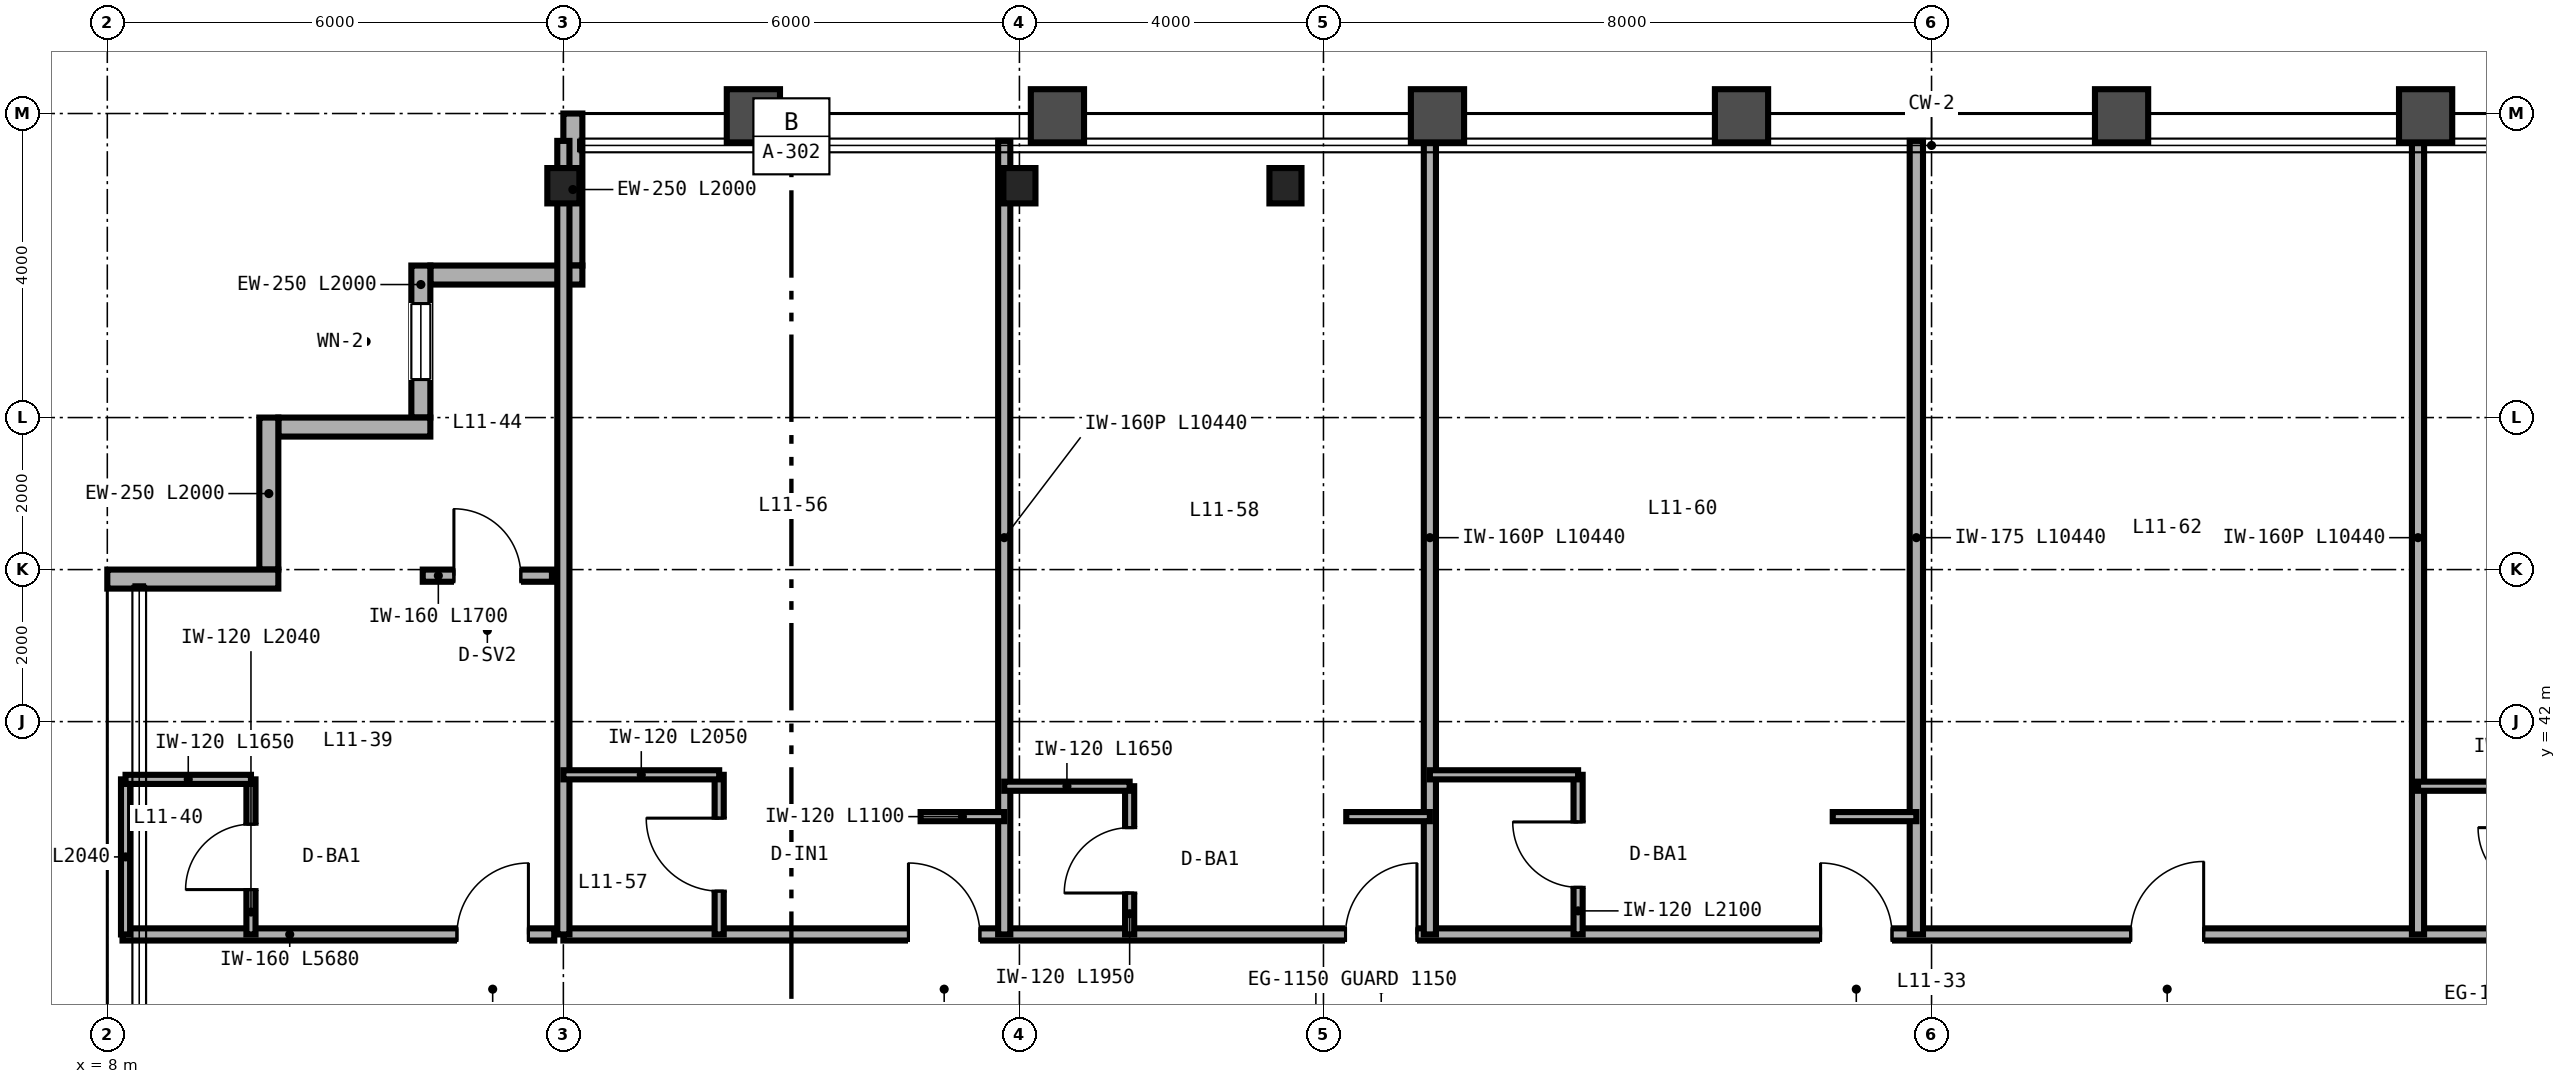
"""IFC4 building model, lengths in metres.
Left out: names, types, materials, properties, quantities, classifications, styles, units other than length and angle.
Written with IfcOpenShell. Run it as: python <this file> out.ifc"""

import sys

from ifc_helpers import new_model, si_unit, direction, frame, frame_2d, origin, origin_2d, place, context, subcontext, project, spatial, rectangle, i_section, extrude, source, transform, mapped, element, fill, save


model = new_model("IFC4")
c1 = context("Model", 3, precision=1e-05, world=origin(), true_north=direction((0.0, 1.0)))
c2 = subcontext(c1, "Body", "Model", "MODEL_VIEW")
j1 = project(units=[si_unit("LENGTHUNIT", "METRE"), si_unit("PLANEANGLEUNIT", "RADIAN")], contexts=[c1])
p1 = place(None, origin())
s1 = spatial("IfcSite", under=j1, at=p1, CompositionType="ELEMENT")
p2 = place(p1, origin())
s2 = spatial("IfcBuilding", under=s1, at=p2, CompositionType="ELEMENT")
p3 = place(p2, frame((0.0, 0.0, 49.2)))
s3 = spatial("IfcBuildingStorey", under=s2, at=p3, CompositionType="ELEMENT", Elevation=49.2)
m1 = source(origin(), c2, "Body", "SweptSolid", [
    extrude(i_section(OverallWidth=0.422, OverallDepth=0.465, WebThickness=0.045, FlangeThickness=0.073, FilletRadius=0.025, at=origin_2d()), origin(), (0.0, 0.0, 1.0), 3.35),
])
for number, where, z_axis, x_axis in (
    (1, (14.0, 49.05, 0.0), (0.0, 0.0, 1.0), (1.0, 0.0, 0.0)),
    (2, (20.0, 49.05, 0.0), (0.0, 0.0, 1.0), (1.0, 0.0, 0.0)),
    (3, (23.5, 49.05, 0.0), (0.0, 0.0, 1.0), (1.0, 0.0, 0.0)),
):
    element("IfcColumn", number, at=place(p3, frame(where, z_axis=z_axis, x_axis=x_axis)), inside=s3, PredefinedType="COLUMN", context=c2, shape_type="MappedRepresentation", body=[
        mapped(m1, transform((0.0, 0.0, 0.0), scale=1.0)),
    ])
p4 = place(p3, frame((14.125, 50.0, 0.0), z_axis=(0.0, 0.0, 1.0), x_axis=(0.0, -1.0, 0.0)))
e4 = element("IfcWall", 4, at=p4, inside=s3, PredefinedType="SOLIDWALL", context=c2, shape_type="SweptSolid", body=[
    extrude(rectangle(XDim=2.0, YDim=0.25, at=frame_2d((1.0, 0.0))), origin(), (0.0, 0.0, 1.0), 2.657),
])
p5 = place(p3, frame((14.25, 47.875, 0.0), z_axis=(0.0, 0.0, 1.0), x_axis=(-1.0, 0.0, 0.0)))
e5 = element("IfcWall", 5, at=p5, inside=s3, PredefinedType="SOLIDWALL", context=c2, shape_type="SweptSolid", body=[
    extrude(rectangle(XDim=2.0, YDim=0.25, at=frame_2d((1.0, 0.0))), origin(), (0.0, 0.0, 1.0), 3.35),
])
p6 = place(p3, frame((12.125, 48.0, 0.0), z_axis=(0.0, 0.0, 1.0), x_axis=(0.0, -1.0, 0.0)))
e6 = element("IfcWall", 6, at=p6, inside=s3, PredefinedType="SOLIDWALL", context=c2, shape_type="SweptSolid", body=[
    extrude(rectangle(XDim=2.0, YDim=0.25, at=frame_2d((1.0, 0.0))), origin(), (0.0, 0.0, 1.0), 3.35),
])
p7 = place(p6, frame((0.5, 0.0, 0.85)))
e7 = element("IfcOpeningElement", 7, at=p7, cuts=e6, PredefinedType="OPENING", context=c2, shape_type="SweptSolid", body=[
    extrude(rectangle(XDim=1.0, YDim=1.9, at=frame_2d((0.5, 0.95))), frame((0.0, 0.135, 0.0), z_axis=(0.0, -1.0, 0.0), x_axis=(1.0, 0.0, 0.0)), (0.0, 0.0, 1.0), 0.27),
])
for number, where, z_axis, x_axis in (
    (8, (12.25, 45.875, 0.0), (0.0, 0.0, 1.0), (-1.0, 0.0, 0.0)),
    (9, (10.125, 46.0, 0.0), (0.0, 0.0, 1.0), (0.0, -1.0, 0.0)),
):
    element("IfcWall", number, at=place(p3, frame(where, z_axis=z_axis, x_axis=x_axis)), inside=s3, PredefinedType="SOLIDWALL", context=c2, shape_type="SweptSolid", body=[
        extrude(rectangle(XDim=2.0, YDim=0.25, at=frame_2d((1.0, 0.0))), origin(), (0.0, 0.0, 1.0), 3.35),
    ])
p8 = place(p3, frame((10.25, 43.875, 0.0), z_axis=(0.0, 0.0, 1.0), x_axis=(-1.0, 0.0, 0.0)))
e10 = element("IfcWall", 10, at=p8, inside=s3, PredefinedType="SOLIDWALL", context=c2, shape_type="SweptSolid", body=[
    extrude(rectangle(XDim=2.25, YDim=0.25, at=frame_2d((1.125, 0.0))), origin(), (0.0, 0.0, 1.0), 3.35),
])
p9 = place(p3, frame((8.2, 39.2, 0.0), z_axis=(0.0, 0.0, 1.0), x_axis=(1.0, 0.0, 0.0)))
e11 = element("IfcWall", 11, at=p9, inside=s3, PredefinedType="PARTITIONING", context=c2, shape_type="SweptSolid", body=[
    extrude(rectangle(XDim=5.68, YDim=0.16, at=frame_2d((2.84, 0.0))), origin(), (0.0, 0.0, 1.0), 3.35),
])
p10 = place(p9, frame((4.4, 0.0, 0.0)))
e12 = element("IfcOpeningElement", 12, at=p10, cuts=e11, PredefinedType="OPENING", context=c2, shape_type="SweptSolid", body=[
    extrude(rectangle(XDim=0.94, YDim=2.15, at=frame_2d((0.47, 1.075))), frame((0.0, 0.09, 0.0), z_axis=(0.0, -1.0, 0.0), x_axis=(1.0, 0.0, 0.0)), (0.0, 0.0, 1.0), 0.18),
])
p11 = place(p3, frame((9.89, 39.2, 0.0), z_axis=(0.0, 0.0, 1.0), x_axis=(0.0, 1.0, 0.0)))
e13 = element("IfcWall", 13, at=p11, inside=s3, PredefinedType="PARTITIONING", context=c2, shape_type="SweptSolid", body=[
    extrude(rectangle(XDim=2.04, YDim=0.12, at=frame_2d((1.02, 0.0))), origin(), (0.0, 0.0, 1.0), 3.35),
])
p12 = place(p11, frame((0.59, 0.0, 0.0)))
e14 = element("IfcOpeningElement", 14, at=p12, cuts=e13, PredefinedType="OPENING", context=c2, shape_type="SweptSolid", body=[
    extrude(rectangle(XDim=0.86, YDim=2.1, at=frame_2d((0.43, 1.05))), frame((0.0, 0.07, 0.0), z_axis=(0.0, -1.0, 0.0), x_axis=(1.0, 0.0, 0.0)), (0.0, 0.0, 1.0), 0.14),
])
p13 = place(p3, frame((8.24, 39.2, 0.0), z_axis=(0.0, 0.0, 1.0), x_axis=(0.0, 1.0, 0.0)))
e15 = element("IfcWall", 15, at=p13, inside=s3, PredefinedType="PARTITIONING", context=c2, shape_type="SweptSolid", body=[
    extrude(rectangle(XDim=2.04, YDim=0.12, at=frame_2d((1.02, 0.0))), origin(), (0.0, 0.0, 1.0), 3.35),
])
p14 = place(p3, frame((8.24, 41.24, 0.0), z_axis=(0.0, 0.0, 1.0), x_axis=(1.0, 0.0, 0.0)))
e16 = element("IfcWall", 16, at=p14, inside=s3, PredefinedType="PARTITIONING", context=c2, shape_type="SweptSolid", body=[
    extrude(rectangle(XDim=1.65, YDim=0.12, at=frame_2d((0.825, 0.0))), origin(), (0.0, 0.0, 1.0), 3.35),
])
p15 = place(p3, frame((12.15, 43.92, 0.0), z_axis=(0.0, 0.0, 1.0), x_axis=(1.0, 0.0, 0.0)))
e17 = element("IfcWall", 17, at=p15, inside=s3, PredefinedType="PARTITIONING", context=c2, shape_type="SweptSolid", body=[
    extrude(rectangle(XDim=1.7, YDim=0.16, at=frame_2d((0.85, 0.0))), origin(), (0.0, 0.0, 1.0), 3.35),
])
p16 = place(p15, frame((0.41, 0.0, 0.0)))
e18 = element("IfcOpeningElement", 18, at=p16, cuts=e17, PredefinedType="OPENING", context=c2, shape_type="SweptSolid", body=[
    extrude(rectangle(XDim=0.88, YDim=2.15, at=frame_2d((0.44, 1.075))), frame((0.0, 0.09, 0.0), z_axis=(0.0, -1.0, 0.0), x_axis=(1.0, 0.0, 0.0)), (0.0, 0.0, 1.0), 0.18),
])
p17 = place(p3, frame((14.0, 39.2, 0.0), z_axis=(0.0, 0.0, 1.0), x_axis=(1.0, 0.0, 0.0)))
e19 = element("IfcWall", 19, at=p17, inside=s3, PredefinedType="PARTITIONING", context=c2, shape_type="SweptSolid", body=[
    extrude(rectangle(XDim=36.0, YDim=0.16, at=frame_2d((18.0, 0.0))), origin(), (0.0, 0.0, 1.0), 2.571),
])
p18 = place(p17, frame((4.54, 0.0, 0.0)))
e20 = element("IfcOpeningElement", 20, at=p18, cuts=e19, PredefinedType="OPENING", context=c2, shape_type="SweptSolid", body=[
    extrude(rectangle(XDim=0.94, YDim=2.15, at=frame_2d((0.47, 1.075))), frame((0.0, 0.09, 0.0), z_axis=(0.0, -1.0, 0.0), x_axis=(1.0, 0.0, 0.0)), (0.0, 0.0, 1.0), 0.18),
])
p19 = place(p17, frame((10.29, 0.0, 0.0)))
e21 = element("IfcOpeningElement", 21, at=p19, cuts=e19, PredefinedType="OPENING", context=c2, shape_type="SweptSolid", body=[
    extrude(rectangle(XDim=0.94, YDim=2.15, at=frame_2d((0.47, 1.075))), frame((0.0, 0.09, 0.0), z_axis=(0.0, -1.0, 0.0), x_axis=(1.0, 0.0, 0.0)), (0.0, 0.0, 1.0), 0.18),
])
p20 = place(p17, frame((16.54, 0.0, 0.0)))
e22 = element("IfcOpeningElement", 22, at=p20, cuts=e19, PredefinedType="OPENING", context=c2, shape_type="SweptSolid", body=[
    extrude(rectangle(XDim=0.94, YDim=2.15, at=frame_2d((0.47, 1.075))), frame((0.0, 0.09, 0.0), z_axis=(0.0, -1.0, 0.0), x_axis=(1.0, 0.0, 0.0)), (0.0, 0.0, 1.0), 0.18),
])
p21 = place(p17, frame((20.62, 0.0, 0.0)))
e23 = element("IfcOpeningElement", 23, at=p21, cuts=e19, PredefinedType="OPENING", context=c2, shape_type="SweptSolid", body=[
    extrude(rectangle(XDim=0.96, YDim=2.15, at=frame_2d((0.48, 1.075))), frame((0.0, 0.09, 0.0), z_axis=(0.0, -1.0, 0.0), x_axis=(1.0, 0.0, 0.0)), (0.0, 0.0, 1.0), 0.18),
])
p22 = place(p17, frame((28.94, 0.0, 0.0)))
e24 = element("IfcOpeningElement", 24, at=p22, cuts=e19, PredefinedType="OPENING", context=c2, shape_type="SweptSolid", body=[
    extrude(rectangle(XDim=0.94, YDim=2.15, at=frame_2d((0.47, 1.075))), frame((0.0, 0.09, 0.0), z_axis=(0.0, -1.0, 0.0), x_axis=(1.0, 0.0, 0.0)), (0.0, 0.0, 1.0), 0.18),
])
p23 = place(p17, frame((34.74, 0.0, 0.0)))
e25 = element("IfcOpeningElement", 25, at=p23, cuts=e19, PredefinedType="OPENING", context=c2, shape_type="SweptSolid", body=[
    extrude(rectangle(XDim=0.94, YDim=2.15, at=frame_2d((0.47, 1.075))), frame((0.0, 0.09, 0.0), z_axis=(0.0, -1.0, 0.0), x_axis=(1.0, 0.0, 0.0)), (0.0, 0.0, 1.0), 0.18),
])
for number, where, z_axis, x_axis in (
    (26, (14.0, 39.2, 0.0), (0.0, 0.0, 1.0), (0.0, 1.0, 0.0)),
    (27, (19.8, 39.2, 0.0), (0.0, 0.0, 1.0), (0.0, 1.0, 0.0)),
):
    element("IfcWall", number, at=place(p3, frame(where, z_axis=z_axis, x_axis=x_axis)), inside=s3, PredefinedType="PARTITIONING", context=c2, shape_type="SweptSolid", body=[
        extrude(rectangle(XDim=10.44, YDim=0.16, at=frame_2d((5.22, 0.0))), origin(), (0.0, 0.0, 1.0), 2.657),
    ])
p24 = place(p3, frame((16.05, 39.2, 0.0), z_axis=(0.0, 0.0, 1.0), x_axis=(0.0, 1.0, 0.0)))
e28 = element("IfcWall", 28, at=p24, inside=s3, PredefinedType="PARTITIONING", context=c2, shape_type="SweptSolid", body=[
    extrude(rectangle(XDim=2.1, YDim=0.12, at=frame_2d((1.05, 0.0))), origin(), (0.0, 0.0, 1.0), 3.35),
])
p25 = place(p24, frame((0.57, 0.0, 0.0)))
e29 = element("IfcOpeningElement", 29, at=p25, cuts=e28, PredefinedType="OPENING", context=c2, shape_type="SweptSolid", body=[
    extrude(rectangle(XDim=0.96, YDim=2.15, at=frame_2d((0.48, 1.075))), frame((0.0, 0.07, 0.0), z_axis=(0.0, -1.0, 0.0), x_axis=(1.0, 0.0, 0.0)), (0.0, 0.0, 1.0), 0.14),
])
p26 = place(p3, frame((14.0, 41.3, 0.0), z_axis=(0.0, 0.0, 1.0), x_axis=(1.0, 0.0, 0.0)))
e30 = element("IfcWall", 30, at=p26, inside=s3, PredefinedType="PARTITIONING", context=c2, shape_type="SweptSolid", body=[
    extrude(rectangle(XDim=2.05, YDim=0.12, at=frame_2d((1.025, 0.0))), origin(), (0.0, 0.0, 1.0), 3.35),
])
p27 = place(p3, frame((18.7, 40.75, 0.0), z_axis=(0.0, 0.0, 1.0), x_axis=(1.0, 0.0, 0.0)))
e31 = element("IfcWall", 31, at=p27, inside=s3, PredefinedType="PARTITIONING", context=c2, shape_type="SweptSolid", body=[
    extrude(rectangle(XDim=1.1, YDim=0.12, at=frame_2d((0.55, 0.0))), origin(), (0.0, 0.0, 1.0), 3.35),
])
p28 = place(p3, frame((25.4, 39.2, 0.0), z_axis=(0.0, 0.0, 1.0), x_axis=(0.0, 1.0, 0.0)))
e32 = element("IfcWall", 32, at=p28, inside=s3, PredefinedType="PARTITIONING", context=c2, shape_type="SweptSolid", body=[
    extrude(rectangle(XDim=10.44, YDim=0.16, at=frame_2d((5.22, 0.0))), origin(), (0.0, 0.0, 1.0), 2.423),
])
p29 = place(p3, frame((21.45, 39.2, 0.0), z_axis=(0.0, 0.0, 1.0), x_axis=(0.0, 1.0, 0.0)))
e33 = element("IfcWall", 33, at=p29, inside=s3, PredefinedType="PARTITIONING", context=c2, shape_type="SweptSolid", body=[
    extrude(rectangle(XDim=1.95, YDim=0.12, at=frame_2d((0.975, 0.0))), origin(), (0.0, 0.0, 1.0), 3.35),
])
p30 = place(p29, frame((0.545, 0.0, 0.0)))
e34 = element("IfcOpeningElement", 34, at=p30, cuts=e33, PredefinedType="OPENING", context=c2, shape_type="SweptSolid", body=[
    extrude(rectangle(XDim=0.86, YDim=2.1, at=frame_2d((0.43, 1.05))), frame((0.0, 0.07, 0.0), z_axis=(0.0, -1.0, 0.0), x_axis=(1.0, 0.0, 0.0)), (0.0, 0.0, 1.0), 0.14),
])
p31 = place(p3, frame((19.8, 41.15, 0.0), z_axis=(0.0, 0.0, 1.0), x_axis=(1.0, 0.0, 0.0)))
e35 = element("IfcWall", 35, at=p31, inside=s3, PredefinedType="PARTITIONING", context=c2, shape_type="SweptSolid", body=[
    extrude(rectangle(XDim=1.65, YDim=0.12, at=frame_2d((0.825, 0.0))), origin(), (0.0, 0.0, 1.0), 3.35),
])
p32 = place(p3, frame((24.3, 40.75, 0.0), z_axis=(0.0, 0.0, 1.0), x_axis=(1.0, 0.0, 0.0)))
e36 = element("IfcWall", 36, at=p32, inside=s3, PredefinedType="PARTITIONING", context=c2, shape_type="SweptSolid", body=[
    extrude(rectangle(XDim=1.1, YDim=0.12, at=frame_2d((0.55, 0.0))), origin(), (0.0, 0.0, 1.0), 3.35),
])
p33 = place(p3, frame((31.8, 39.2, 0.0), z_axis=(0.0, 0.0, 1.0), x_axis=(0.0, 1.0, 0.0)))
e37 = element("IfcWall", 37, at=p33, inside=s3, PredefinedType="PARTITIONING", context=c2, shape_type="SweptSolid", body=[
    extrude(rectangle(XDim=10.44, YDim=0.175, at=frame_2d((5.22, 0.0))), origin(), (0.0, 0.0, 1.0), 2.423),
])
p34 = place(p3, frame((27.35, 39.2, 0.0), z_axis=(0.0, 0.0, 1.0), x_axis=(0.0, 1.0, 0.0)))
e38 = element("IfcWall", 38, at=p34, inside=s3, PredefinedType="PARTITIONING", context=c2, shape_type="SweptSolid", body=[
    extrude(rectangle(XDim=2.1, YDim=0.12, at=frame_2d((1.05, 0.0))), origin(), (0.0, 0.0, 1.0), 3.35),
])
p35 = place(p34, frame((0.62, 0.0, 0.0)))
e39 = element("IfcOpeningElement", 39, at=p35, cuts=e38, PredefinedType="OPENING", context=c2, shape_type="SweptSolid", body=[
    extrude(rectangle(XDim=0.86, YDim=2.1, at=frame_2d((0.43, 1.05))), frame((0.0, 0.07, 0.0), z_axis=(0.0, -1.0, 0.0), x_axis=(1.0, 0.0, 0.0)), (0.0, 0.0, 1.0), 0.14),
])
p36 = place(p3, frame((25.4, 41.3, 0.0), z_axis=(0.0, 0.0, 1.0), x_axis=(1.0, 0.0, 0.0)))
e40 = element("IfcWall", 40, at=p36, inside=s3, PredefinedType="PARTITIONING", context=c2, shape_type="SweptSolid", body=[
    extrude(rectangle(XDim=1.95, YDim=0.12, at=frame_2d((0.975, 0.0))), origin(), (0.0, 0.0, 1.0), 3.35),
])
p37 = place(p3, frame((30.7, 40.75, 0.0), z_axis=(0.0, 0.0, 1.0), x_axis=(1.0, 0.0, 0.0)))
e41 = element("IfcWall", 41, at=p37, inside=s3, PredefinedType="PARTITIONING", context=c2, shape_type="SweptSolid", body=[
    extrude(rectangle(XDim=1.1, YDim=0.12, at=frame_2d((0.55, 0.0))), origin(), (0.0, 0.0, 1.0), 3.35),
])
p38 = place(p3, frame((38.4, 39.2, 0.0), z_axis=(0.0, 0.0, 1.0), x_axis=(0.0, 1.0, 0.0)))
e42 = element("IfcWall", 42, at=p38, inside=s3, PredefinedType="PARTITIONING", context=c2, shape_type="SweptSolid", body=[
    extrude(rectangle(XDim=10.44, YDim=0.16, at=frame_2d((5.22, 0.0))), origin(), (0.0, 0.0, 1.0), 2.423),
])
p39 = place(p3, frame((38.4, 41.15, 0.0), z_axis=(0.0, 0.0, 1.0), x_axis=(1.0, 0.0, 0.0)))
e43 = element("IfcWall", 43, at=p39, inside=s3, PredefinedType="PARTITIONING", context=c2, shape_type="SweptSolid", body=[
    extrude(rectangle(XDim=1.65, YDim=0.12, at=frame_2d((0.825, 0.0))), origin(), (0.0, 0.0, 1.0), 3.35),
])
m2 = source(origin(), c2, "Body", "SweptSolid", [
    extrude(rectangle(XDim=1.0, YDim=1.9, at=frame_2d((0.5, 0.95))), frame((0.0, 0.03, 0.0), z_axis=(0.0, -1.0, 0.0), x_axis=(1.0, 0.0, 0.0)), (0.0, 0.0, 1.0), 0.06),
])
p40 = place(p7, origin())
e44 = element("IfcWindow", 44, at=p40, inside=s3, PartitioningType="SINGLE_PANEL", PredefinedType="WINDOW", context=c2, shape_type="MappedRepresentation", body=[
    mapped(m2, transform((0.0, 0.0, 0.0), scale=1.0)),
])
fill(e7, e44)
m3 = source(origin(), c2, "Body", "SweptSolid", [
    extrude(rectangle(XDim=0.86, YDim=2.1, at=frame_2d((0.43, 1.05))), frame((0.0, 0.025, 0.0), z_axis=(0.0, -1.0, 0.0), x_axis=(1.0, 0.0, 0.0)), (0.0, 0.0, 1.0), 0.05),
])
p41 = place(p12, origin())
e45 = element("IfcDoor", 45, at=p41, inside=s3, OperationType="SINGLE_SWING_LEFT", PredefinedType="DOOR", context=c2, shape_type="MappedRepresentation", body=[
    mapped(m3, transform((0.0, 0.0, 0.0), scale=1.0)),
])
fill(e14, e45)
m4 = source(origin(), c2, "Body", "SweptSolid", [
    extrude(rectangle(XDim=0.94, YDim=2.15, at=frame_2d((0.47, 1.075))), frame((0.0, 0.025, 0.0), z_axis=(0.0, -1.0, 0.0), x_axis=(1.0, 0.0, 0.0)), (0.0, 0.0, 1.0), 0.05),
])
p42 = place(p10, origin())
e46 = element("IfcDoor", 46, at=p42, inside=s3, OperationType="SINGLE_SWING_RIGHT", PredefinedType="DOOR", context=c2, shape_type="MappedRepresentation", body=[
    mapped(m4, transform((0.0, 0.0, 0.0), scale=1.0)),
])
fill(e12, e46)
m5 = source(origin(), c2, "Body", "SweptSolid", [
    extrude(rectangle(XDim=0.88, YDim=2.15, at=frame_2d((0.44, 1.075))), frame((0.0, 0.025, 0.0), z_axis=(0.0, -1.0, 0.0), x_axis=(1.0, 0.0, 0.0)), (0.0, 0.0, 1.0), 0.05),
])
p43 = place(p16, origin())
e47 = element("IfcDoor", 47, at=p43, inside=s3, OperationType="SINGLE_SWING_LEFT", PredefinedType="DOOR", context=c2, shape_type="MappedRepresentation", body=[
    mapped(m5, transform((0.0, 0.0, 0.0), scale=1.0)),
])
fill(e18, e47)
m6 = source(origin(), c2, "Body", "SweptSolid", [
    extrude(rectangle(XDim=0.96, YDim=2.15, at=frame_2d((0.48, 1.075))), frame((0.0, 0.025, 0.0), z_axis=(0.0, -1.0, 0.0), x_axis=(1.0, 0.0, 0.0)), (0.0, 0.0, 1.0), 0.05),
])
p44 = place(p25, origin())
e48 = element("IfcDoor", 48, at=p44, inside=s3, OperationType="SINGLE_SWING_RIGHT", PredefinedType="DOOR", context=c2, shape_type="MappedRepresentation", body=[
    mapped(m6, transform((0.0, 0.0, 0.0), scale=1.0)),
])
fill(e29, e48)
p45 = place(p30, origin())
e49 = element("IfcDoor", 49, at=p45, inside=s3, OperationType="SINGLE_SWING_LEFT", PredefinedType="DOOR", context=c2, shape_type="MappedRepresentation", body=[
    mapped(m3, transform((0.0, 0.0, 0.0), scale=1.0)),
])
fill(e34, e49)
p46 = place(p35, origin())
e50 = element("IfcDoor", 50, at=p46, inside=s3, OperationType="SINGLE_SWING_RIGHT", PredefinedType="DOOR", context=c2, shape_type="MappedRepresentation", body=[
    mapped(m3, transform((0.0, 0.0, 0.0), scale=1.0)),
])
fill(e39, e50)
p47 = place(p18, origin())
e51 = element("IfcDoor", 51, at=p47, inside=s3, OperationType="SINGLE_SWING_LEFT", PredefinedType="DOOR", context=c2, shape_type="MappedRepresentation", body=[
    mapped(m4, transform((0.0, 0.0, 0.0), scale=1.0)),
])
fill(e20, e51)
p48 = place(p19, origin())
e52 = element("IfcDoor", 52, at=p48, inside=s3, OperationType="SINGLE_SWING_RIGHT", PredefinedType="DOOR", context=c2, shape_type="MappedRepresentation", body=[
    mapped(m4, transform((0.0, 0.0, 0.0), scale=1.0)),
])
fill(e21, e52)
p49 = place(p20, origin())
e53 = element("IfcDoor", 53, at=p49, inside=s3, OperationType="SINGLE_SWING_LEFT", PredefinedType="DOOR", context=c2, shape_type="MappedRepresentation", body=[
    mapped(m4, transform((0.0, 0.0, 0.0), scale=1.0)),
])
fill(e22, e53)
p50 = place(p21, origin())
e54 = element("IfcDoor", 54, at=p50, inside=s3, OperationType="SINGLE_SWING_RIGHT", PredefinedType="DOOR", context=c2, shape_type="MappedRepresentation", body=[
    mapped(m6, transform((0.0, 0.0, 0.0), scale=1.0)),
])
fill(e23, e54)
save(model, sys.argv[1])
